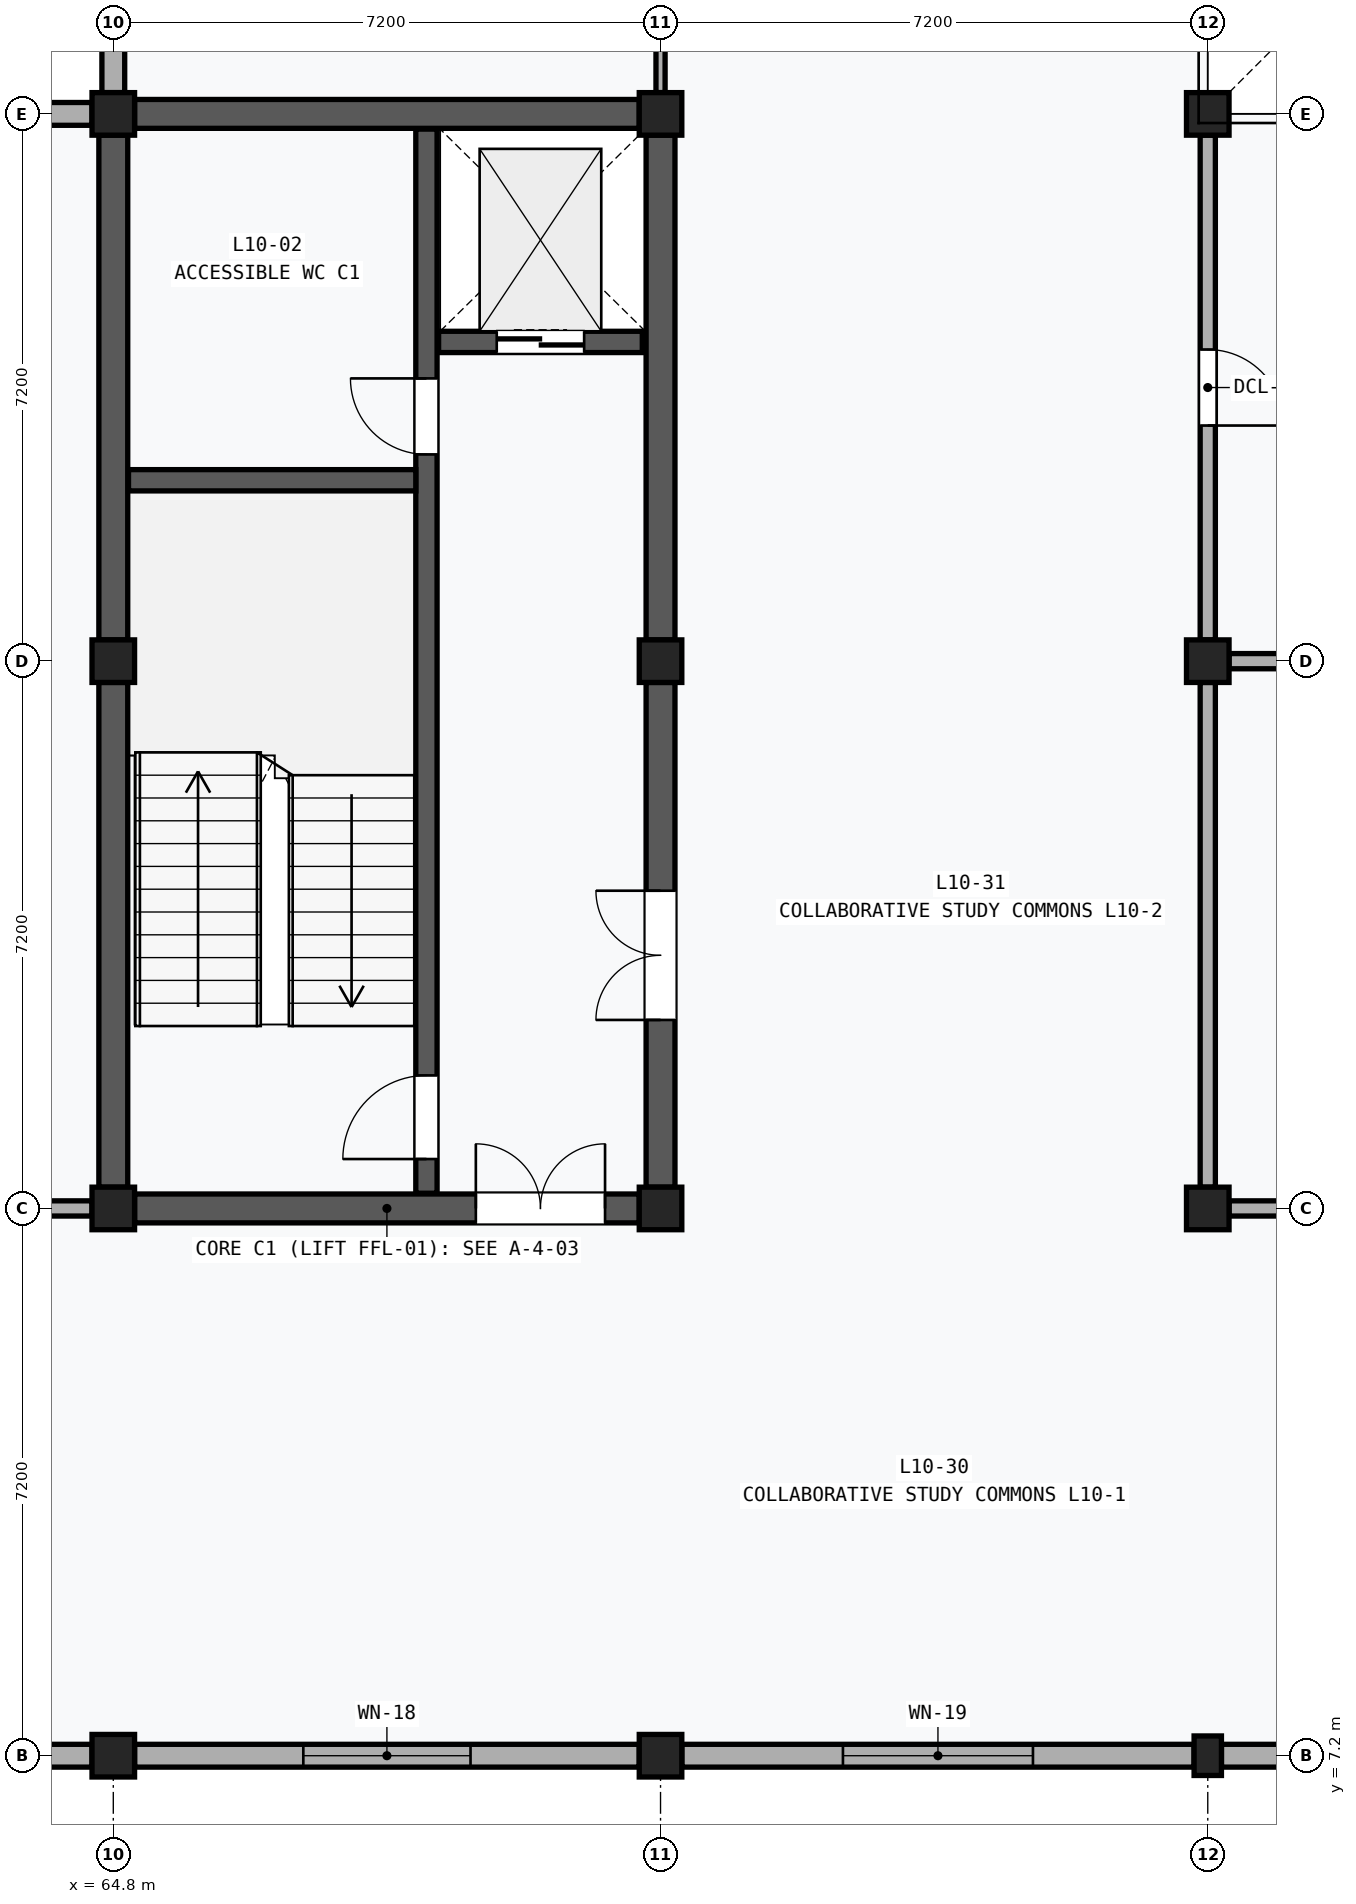
"""IFC4 building model, lengths in metres.
Left out: names, types, materials, properties, quantities, classifications, styles, units other than length and angle.
Written with IfcOpenShell. Run it as: python <this file> out.ifc"""

import sys

from ifc_helpers import new_model, si_unit, direction, frame, frame_2d, origin, origin_2d, place, context, subcontext, project, spatial, rectangle, extrude, element, fill, save


model = new_model("IFC4")
c1 = context("Model", 3, precision=1e-05, world=origin(), true_north=direction((0.0, 1.0)))
c2 = subcontext(c1, "Body", "Model", "MODEL_VIEW")
j1 = project(units=[si_unit("LENGTHUNIT", "METRE"), si_unit("PLANEANGLEUNIT", "RADIAN")], contexts=[c1])
p1 = place(None, origin())
s1 = spatial("IfcSite", under=j1, at=p1, CompositionType="ELEMENT")
p2 = place(p1, origin())
s2 = spatial("IfcBuilding", under=s1, at=p2, CompositionType="ELEMENT")
p3 = place(p2, frame((0.0, 0.0, 42.8)))
s3 = spatial("IfcBuildingStorey", under=s2, at=p3, CompositionType="ELEMENT", Elevation=42.8)
for number, where, z_axis, x_axis in (
    (1, (64.8, 7.2, 0.0), (0.0, 0.0, 1.0), (1.0, 0.0, 0.0)),
    (2, (64.8, 14.4, 0.0), (0.0, 0.0, 1.0), (1.0, 0.0, 0.0)),
    (3, (64.8, 21.6, 0.0), (0.0, 0.0, 1.0), (1.0, 0.0, 0.0)),
    (4, (64.8, 28.8, 0.0), (0.0, 0.0, 1.0), (1.0, 0.0, 0.0)),
    (5, (72.0, 7.2, 0.0), (0.0, 0.0, 1.0), (1.0, 0.0, 0.0)),
    (6, (72.0, 14.4, 0.0), (0.0, 0.0, 1.0), (1.0, 0.0, 0.0)),
    (7, (72.0, 21.6, 0.0), (0.0, 0.0, 1.0), (1.0, 0.0, 0.0)),
    (8, (72.0, 28.8, 0.0), (0.0, 0.0, 1.0), (1.0, 0.0, 0.0)),
):
    element("IfcColumn", number, at=place(p3, frame(where, z_axis=z_axis, x_axis=x_axis)), inside=s3, PredefinedType="COLUMN", context=c2, shape_type="SweptSolid", body=[
        extrude(rectangle(XDim=0.56, YDim=0.56, at=origin_2d()), origin(), (0.0, 0.0, 1.0), 4.0),
    ])
p4 = place(p3, frame((79.2, 7.2, 0.0), z_axis=(0.0, 0.0, 1.0), x_axis=(1.0, 0.0, 0.0)))
e9 = element("IfcColumn", 9, at=p4, inside=s3, PredefinedType="PILASTER", context=c2, shape_type="SweptSolid", body=[
    extrude(rectangle(XDim=0.36, YDim=0.52, at=origin_2d()), origin(), (0.0, 0.0, 1.0), 4.0),
])
for number, where, z_axis, x_axis in (
    (10, (79.2, 14.4, 0.0), (0.0, 0.0, 1.0), (1.0, 0.0, 0.0)),
    (11, (79.2, 21.6, 0.0), (0.0, 0.0, 1.0), (1.0, 0.0, 0.0)),
    (12, (79.2, 28.8, 0.0), (0.0, 0.0, 1.0), (1.0, 0.0, 0.0)),
):
    element("IfcColumn", number, at=place(p3, frame(where, z_axis=z_axis, x_axis=x_axis)), inside=s3, PredefinedType="COLUMN", context=c2, shape_type="SweptSolid", body=[
        extrude(rectangle(XDim=0.56, YDim=0.56, at=origin_2d()), origin(), (0.0, 0.0, 1.0), 4.0),
    ])
p5 = place(p3, frame((57.88, 7.2, 0.0), z_axis=(0.0, 0.0, 1.0), x_axis=(1.0, 0.0, 0.0)))
e13 = element("IfcWall", 13, at=p5, inside=s3, PredefinedType="SOLIDWALL", context=c2, shape_type="SweptSolid", body=[
    extrude(rectangle(XDim=6.64, YDim=0.3, at=frame_2d((3.32, 0.0))), origin(), (0.0, 0.0, 1.0), 3.18),
])
p6 = place(p5, frame((2.37, 0.0, 1.1)))
e14 = element("IfcOpeningElement", 14, at=p6, cuts=e13, PredefinedType="OPENING", context=c2, shape_type="SweptSolid", body=[
    extrude(rectangle(XDim=1.9, YDim=1.5, at=frame_2d((0.95, 0.75))), frame((0.0, 0.162, 0.0), z_axis=(0.0, -1.0, 0.0), x_axis=(1.0, 0.0, 0.0)), (0.0, 0.0, 1.0), 0.324),
])
p7 = place(p3, frame((57.78, 28.8, 0.0), z_axis=(0.0, 0.0, 1.0), x_axis=(1.0, 0.0, 0.0)))
e15 = element("IfcWall", 15, at=p7, inside=s3, PredefinedType="SOLIDWALL", context=c2, shape_type="SweptSolid", body=[
    extrude(rectangle(XDim=6.74, YDim=0.3, at=frame_2d((3.37, 0.0))), origin(), (0.0, 0.0, 1.0), 3.18),
])
p8 = place(p7, frame((2.62, 0.0, 1.2)))
e16 = element("IfcOpeningElement", 16, at=p8, cuts=e15, PredefinedType="OPENING", context=c2, shape_type="SweptSolid", body=[
    extrude(rectangle(XDim=1.5, YDim=1.35, at=frame_2d((0.75, 0.675))), frame((0.0, 0.162, 0.0), z_axis=(0.0, -1.0, 0.0), x_axis=(1.0, 0.0, 0.0)), (0.0, 0.0, 1.0), 0.324),
])
p9 = place(p3, frame((65.08, 7.2, 0.0), z_axis=(0.0, 0.0, 1.0), x_axis=(1.0, 0.0, 0.0)))
e17 = element("IfcWall", 17, at=p9, inside=s3, PredefinedType="SOLIDWALL", context=c2, shape_type="SweptSolid", body=[
    extrude(rectangle(XDim=6.64, YDim=0.3, at=frame_2d((3.32, 0.0))), origin(), (0.0, 0.0, 1.0), 3.18),
])
p10 = place(p9, frame((2.22, 0.0, 1.1)))
e18 = element("IfcOpeningElement", 18, at=p10, cuts=e17, PredefinedType="OPENING", context=c2, shape_type="SweptSolid", body=[
    extrude(rectangle(XDim=2.2, YDim=1.5, at=frame_2d((1.1, 0.75))), frame((0.0, 0.162, 0.0), z_axis=(0.0, -1.0, 0.0), x_axis=(1.0, 0.0, 0.0)), (0.0, 0.0, 1.0), 0.324),
])
p11 = place(p3, frame((64.8, 29.08, 0.0), z_axis=(0.0, 0.0, 1.0), x_axis=(0.0, 1.0, 0.0)))
e19 = element("IfcWall", 19, at=p11, inside=s3, PredefinedType="SOLIDWALL", context=c2, shape_type="SweptSolid", body=[
    extrude(rectangle(XDim=6.64, YDim=0.3, at=frame_2d((3.32, 0.0))), origin(), (0.0, 0.0, 1.0), 3.18),
])
p12 = place(p3, frame((72.28, 7.2, 0.0), z_axis=(0.0, 0.0, 1.0), x_axis=(1.0, 0.0, 0.0)))
e20 = element("IfcWall", 20, at=p12, inside=s3, PredefinedType="SOLIDWALL", context=c2, shape_type="SweptSolid", body=[
    extrude(rectangle(XDim=6.74, YDim=0.3, at=frame_2d((3.37, 0.0))), origin(), (0.0, 0.0, 1.0), 3.18),
])
p13 = place(p12, frame((2.12, 0.0, 1.1)))
e21 = element("IfcOpeningElement", 21, at=p13, cuts=e20, PredefinedType="OPENING", context=c2, shape_type="SweptSolid", body=[
    extrude(rectangle(XDim=2.5, YDim=1.5, at=frame_2d((1.25, 0.75))), frame((0.0, 0.162, 0.0), z_axis=(0.0, -1.0, 0.0), x_axis=(1.0, 0.0, 0.0)), (0.0, 0.0, 1.0), 0.324),
])
p14 = place(p3, frame((79.38, 7.2, 0.0), z_axis=(0.0, 0.0, 1.0), x_axis=(1.0, 0.0, 0.0)))
e22 = element("IfcWall", 22, at=p14, inside=s3, PredefinedType="SOLIDWALL", context=c2, shape_type="SweptSolid", body=[
    extrude(rectangle(XDim=6.74, YDim=0.3, at=frame_2d((3.37, 0.0))), origin(), (0.0, 0.0, 1.0), 3.18),
])
p15 = place(p14, frame((2.62, 0.0, 1.2)))
e23 = element("IfcOpeningElement", 23, at=p15, cuts=e22, PredefinedType="OPENING", context=c2, shape_type="SweptSolid", body=[
    extrude(rectangle(XDim=1.5, YDim=1.35, at=frame_2d((0.75, 0.675))), frame((0.0, 0.162, 0.0), z_axis=(0.0, -1.0, 0.0), x_axis=(1.0, 0.0, 0.0)), (0.0, 0.0, 1.0), 0.324),
])
for number, where, z_axis, x_axis in (
    (24, (64.8, 14.68, 0.0), (0.0, 0.0, 1.0), (0.0, 1.0, 0.0)),
    (25, (64.8, 21.88, 0.0), (0.0, 0.0, 1.0), (0.0, 1.0, 0.0)),
):
    element("IfcWall", number, at=place(p3, frame(where, z_axis=z_axis, x_axis=x_axis)), inside=s3, PredefinedType="SHEAR", context=c2, shape_type="SweptSolid", body=[
        extrude(rectangle(XDim=6.64, YDim=0.38, at=frame_2d((3.32, 0.0))), origin(), (0.0, 0.0, 1.0), 3.02),
    ])
p16 = place(p3, frame((72.0, 14.68, 0.0), z_axis=(0.0, 0.0, 1.0), x_axis=(0.0, 1.0, 0.0)))
e26 = element("IfcWall", 26, at=p16, inside=s3, PredefinedType="SHEAR", context=c2, shape_type="SweptSolid", body=[
    extrude(rectangle(XDim=6.64, YDim=0.38, at=frame_2d((3.32, 0.0))), origin(), (0.0, 0.0, 1.0), 3.02),
])
p17 = place(p16, frame((2.2, 0.0, 0.0)))
e27 = element("IfcOpeningElement", 27, at=p17, cuts=e26, PredefinedType="OPENING", context=c2, shape_type="SweptSolid", body=[
    extrude(rectangle(XDim=1.7, YDim=2.25, at=frame_2d((0.85, 1.125))), frame((0.0, 0.202, 0.0), z_axis=(0.0, -1.0, 0.0), x_axis=(1.0, 0.0, 0.0)), (0.0, 0.0, 1.0), 0.404),
])
p18 = place(p3, frame((72.0, 21.88, 0.0), z_axis=(0.0, 0.0, 1.0), x_axis=(0.0, 1.0, 0.0)))
e28 = element("IfcWall", 28, at=p18, inside=s3, PredefinedType="SHEAR", context=c2, shape_type="SweptSolid", body=[
    extrude(rectangle(XDim=6.64, YDim=0.38, at=frame_2d((3.32, 0.0))), origin(), (0.0, 0.0, 1.0), 3.02),
])
p19 = place(p3, frame((65.08, 14.4, 0.0), z_axis=(0.0, 0.0, 1.0), x_axis=(1.0, 0.0, 0.0)))
e29 = element("IfcWall", 29, at=p19, inside=s3, PredefinedType="SHEAR", context=c2, shape_type="SweptSolid", body=[
    extrude(rectangle(XDim=6.64, YDim=0.38, at=frame_2d((3.32, 0.0))), origin(), (0.0, 0.0, 1.0), 3.02),
])
p20 = place(p19, frame((4.49, 0.0, 0.0)))
e30 = element("IfcOpeningElement", 30, at=p20, cuts=e29, PredefinedType="OPENING", context=c2, shape_type="SweptSolid", body=[
    extrude(rectangle(XDim=1.7, YDim=2.25, at=frame_2d((0.85, 1.125))), frame((0.0, 0.202, 0.0), z_axis=(0.0, -1.0, 0.0), x_axis=(1.0, 0.0, 0.0)), (0.0, 0.0, 1.0), 0.404),
])
p21 = place(p3, frame((65.08, 28.8, 0.0), z_axis=(0.0, 0.0, 1.0), x_axis=(1.0, 0.0, 0.0)))
e31 = element("IfcWall", 31, at=p21, inside=s3, PredefinedType="SHEAR", context=c2, shape_type="SweptSolid", body=[
    extrude(rectangle(XDim=6.64, YDim=0.38, at=frame_2d((3.32, 0.0))), origin(), (0.0, 0.0, 1.0), 3.02),
])
p22 = place(p3, frame((68.92, 14.6, 0.0), z_axis=(0.0, 0.0, 1.0), x_axis=(0.0, 1.0, 0.0)))
e32 = element("IfcWall", 32, at=p22, inside=s3, PredefinedType="SHEAR", context=c2, shape_type="SweptSolid", body=[
    extrude(rectangle(XDim=14.0, YDim=0.28, at=frame_2d((7.0, 0.0))), origin(), (0.0, 0.0, 1.0), 3.75),
])
p23 = place(p22, frame((0.45, 0.0, 0.0)))
e33 = element("IfcOpeningElement", 33, at=p23, cuts=e32, PredefinedType="OPENING", context=c2, shape_type="SweptSolid", body=[
    extrude(rectangle(XDim=1.1, YDim=2.15, at=frame_2d((0.55, 1.075))), frame((0.0, 0.152, 0.0), z_axis=(0.0, -1.0, 0.0), x_axis=(1.0, 0.0, 0.0)), (0.0, 0.0, 1.0), 0.304),
])
p24 = place(p22, frame((9.72, 0.0, 0.0)))
e34 = element("IfcOpeningElement", 34, at=p24, cuts=e32, PredefinedType="OPENING", context=c2, shape_type="SweptSolid", body=[
    extrude(rectangle(XDim=1.0, YDim=2.15, at=frame_2d((0.5, 1.075))), frame((0.0, 0.152, 0.0), z_axis=(0.0, -1.0, 0.0), x_axis=(1.0, 0.0, 0.0)), (0.0, 0.0, 1.0), 0.304),
])
p25 = place(p3, frame((65.0, 23.98, 0.0), z_axis=(0.0, 0.0, 1.0), x_axis=(1.0, 0.0, 0.0)))
e35 = element("IfcWall", 35, at=p25, inside=s3, PredefinedType="SHEAR", context=c2, shape_type="SweptSolid", body=[
    extrude(rectangle(XDim=3.78, YDim=0.28, at=frame_2d((1.89, 0.0))), origin(), (0.0, 0.0, 1.0), 3.75),
])
p26 = place(p3, frame((69.08, 25.8, 0.0), z_axis=(0.0, 0.0, 1.0), x_axis=(1.0, 0.0, 0.0)))
e36 = element("IfcWall", 36, at=p26, inside=s3, PredefinedType="SHEAR", context=c2, shape_type="SweptSolid", body=[
    extrude(rectangle(XDim=2.68, YDim=0.28, at=frame_2d((1.34, 0.0))), origin(), (0.0, 0.0, 1.0), 3.75),
])
p27 = place(p26, frame((0.765, 0.0, 0.0)))
e37 = element("IfcOpeningElement", 37, at=p27, cuts=e36, PredefinedType="OPENING", context=c2, shape_type="SweptSolid", body=[
    extrude(rectangle(XDim=1.15, YDim=2.2, at=frame_2d((0.575, 1.1))), frame((0.0, 0.152, 0.0), z_axis=(0.0, -1.0, 0.0), x_axis=(1.0, 0.0, 0.0)), (0.0, 0.0, 1.0), 0.304),
])
p28 = place(p3, frame((57.88, 14.4, 0.0), z_axis=(0.0, 0.0, 1.0), x_axis=(1.0, 0.0, 0.0)))
e38 = element("IfcWall", 38, at=p28, inside=s3, PredefinedType="PARTITIONING", context=c2, shape_type="SweptSolid", body=[
    extrude(rectangle(XDim=6.64, YDim=0.2, at=frame_2d((3.32, 0.0))), origin(), (0.0, 0.0, 1.0), 3.02),
])
p29 = place(p28, frame((2.74, 0.0, 0.0)))
e39 = element("IfcOpeningElement", 39, at=p29, cuts=e38, PredefinedType="OPENING", context=c2, shape_type="SweptSolid", body=[
    extrude(rectangle(XDim=1.16, YDim=2.22, at=frame_2d((0.58, 1.11))), frame((0.0, 0.112, 0.0), z_axis=(0.0, -1.0, 0.0), x_axis=(1.0, 0.0, 0.0)), (0.0, 0.0, 1.0), 0.224),
])
p30 = place(p3, frame((72.0, 29.08, 0.0), z_axis=(0.0, 0.0, 1.0), x_axis=(0.0, 1.0, 0.0)))
e40 = element("IfcWall", 40, at=p30, inside=s3, PredefinedType="MOVABLE", context=c2, shape_type="SweptSolid", body=[
    extrude(rectangle(XDim=6.64, YDim=0.12, at=frame_2d((3.32, 0.0))), origin(), (0.0, 0.0, 1.0), 3.02),
])
p31 = place(p30, frame((2.72, 0.0, 0.0)))
e41 = element("IfcOpeningElement", 41, at=p31, cuts=e40, PredefinedType="OPENING", context=c2, shape_type="SweptSolid", body=[
    extrude(rectangle(XDim=1.2, YDim=2.24, at=frame_2d((0.6, 1.12))), frame((0.0, 0.072, 0.0), z_axis=(0.0, -1.0, 0.0), x_axis=(1.0, 0.0, 0.0)), (0.0, 0.0, 1.0), 0.144),
])
p32 = place(p3, frame((79.48, 14.4, 0.0), z_axis=(0.0, 0.0, 1.0), x_axis=(1.0, 0.0, 0.0)))
e42 = element("IfcWall", 42, at=p32, inside=s3, PredefinedType="PARTITIONING", context=c2, shape_type="SweptSolid", body=[
    extrude(rectangle(XDim=6.64, YDim=0.2, at=frame_2d((3.32, 0.0))), origin(), (0.0, 0.0, 1.0), 3.02),
])
p33 = place(p32, frame((2.68, 0.0, 0.0)))
e43 = element("IfcOpeningElement", 43, at=p33, cuts=e42, PredefinedType="OPENING", context=c2, shape_type="SweptSolid", body=[
    extrude(rectangle(XDim=1.28, YDim=2.28, at=frame_2d((0.64, 1.14))), frame((0.0, 0.112, 0.0), z_axis=(0.0, -1.0, 0.0), x_axis=(1.0, 0.0, 0.0)), (0.0, 0.0, 1.0), 0.224),
])
for number, where, z_axis, x_axis in (
    (44, (79.48, 21.6, 0.0), (0.0, 0.0, 1.0), (1.0, 0.0, 0.0)),
    (45, (79.2, 14.68, 0.0), (0.0, 0.0, 1.0), (0.0, 1.0, 0.0)),
):
    element("IfcWall", number, at=place(p3, frame(where, z_axis=z_axis, x_axis=x_axis)), inside=s3, PredefinedType="PARTITIONING", context=c2, shape_type="SweptSolid", body=[
        extrude(rectangle(XDim=6.64, YDim=0.2, at=frame_2d((3.32, 0.0))), origin(), (0.0, 0.0, 1.0), 3.02),
    ])
p34 = place(p3, frame((79.2, 21.88, 0.0), z_axis=(0.0, 0.0, 1.0), x_axis=(0.0, 1.0, 0.0)))
e46 = element("IfcWall", 46, at=p34, inside=s3, PredefinedType="PARTITIONING", context=c2, shape_type="SweptSolid", body=[
    extrude(rectangle(XDim=6.64, YDim=0.2, at=frame_2d((3.32, 0.0))), origin(), (0.0, 0.0, 1.0), 3.02),
])
p35 = place(p34, frame((2.82, 0.0, 0.0)))
e47 = element("IfcOpeningElement", 47, at=p35, cuts=e46, PredefinedType="OPENING", context=c2, shape_type="SweptSolid", body=[
    extrude(rectangle(XDim=1.0, YDim=2.1, at=frame_2d((0.5, 1.05))), frame((0.0, 0.112, 0.0), z_axis=(0.0, -1.0, 0.0), x_axis=(1.0, 0.0, 0.0)), (0.0, 0.0, 1.0), 0.224),
])
p36 = place(p10, origin())
e48 = element("IfcWindow", 48, at=p36, inside=s3, PartitioningType="SINGLE_PANEL", PredefinedType="WINDOW", context=c2, shape_type="SweptSolid", body=[
    extrude(rectangle(XDim=2.2, YDim=1.5, at=frame_2d((1.1, 0.75))), frame((0.0, 0.03, 0.0), z_axis=(0.0, -1.0, 0.0), x_axis=(1.0, 0.0, 0.0)), (0.0, 0.0, 1.0), 0.06),
])
fill(e18, e48)
p37 = place(p13, origin())
e49 = element("IfcWindow", 49, at=p37, inside=s3, PartitioningType="SINGLE_PANEL", PredefinedType="WINDOW", context=c2, shape_type="SweptSolid", body=[
    extrude(rectangle(XDim=2.5, YDim=1.5, at=frame_2d((1.25, 0.75))), frame((0.0, 0.03, 0.0), z_axis=(0.0, -1.0, 0.0), x_axis=(1.0, 0.0, 0.0)), (0.0, 0.0, 1.0), 0.06),
])
fill(e21, e49)
p38 = place(p17, origin())
e50 = element("IfcDoor", 50, at=p38, inside=s3, OperationType="DOUBLE_DOOR_SINGLE_SWING", PredefinedType="DOOR", context=c2, shape_type="SweptSolid", body=[
    extrude(rectangle(XDim=1.7, YDim=2.25, at=frame_2d((0.85, 1.125))), frame((0.0, 0.025, 0.0), z_axis=(0.0, -1.0, 0.0), x_axis=(1.0, 0.0, 0.0)), (0.0, 0.0, 1.0), 0.05),
])
fill(e27, e50)
p39 = place(p20, origin())
e51 = element("IfcDoor", 51, at=p39, inside=s3, OperationType="DOUBLE_DOOR_SINGLE_SWING", PredefinedType="DOOR", context=c2, shape_type="SweptSolid", body=[
    extrude(rectangle(XDim=1.7, YDim=2.25, at=frame_2d((0.85, 1.125))), frame((0.0, 0.025, 0.0), z_axis=(0.0, -1.0, 0.0), x_axis=(1.0, 0.0, 0.0)), (0.0, 0.0, 1.0), 0.05),
])
fill(e30, e51)
p40 = place(p23, origin())
e52 = element("IfcDoor", 52, at=p40, inside=s3, OperationType="SINGLE_SWING_LEFT", PredefinedType="DOOR", context=c2, shape_type="SweptSolid", body=[
    extrude(rectangle(XDim=1.1, YDim=2.15, at=frame_2d((0.55, 1.075))), frame((0.0, 0.025, 0.0), z_axis=(0.0, -1.0, 0.0), x_axis=(1.0, 0.0, 0.0)), (0.0, 0.0, 1.0), 0.05),
])
fill(e33, e52)
p41 = place(p24, origin())
e53 = element("IfcDoor", 53, at=p41, inside=s3, OperationType="SINGLE_SWING_RIGHT", PredefinedType="DOOR", context=c2, shape_type="SweptSolid", body=[
    extrude(rectangle(XDim=1.0, YDim=2.15, at=frame_2d((0.5, 1.075))), frame((0.0, 0.025, 0.0), z_axis=(0.0, -1.0, 0.0), x_axis=(1.0, 0.0, 0.0)), (0.0, 0.0, 1.0), 0.05),
])
fill(e34, e53)
p42 = place(p27, frame((1.15, 0.0, 0.0), z_axis=(0.0, 0.0, 1.0), x_axis=(-1.0, 0.0, 0.0)))
e54 = element("IfcDoor", 54, at=p42, inside=s3, OperationType="DOUBLE_DOOR_SLIDING", PredefinedType="DOOR", context=c2, shape_type="SweptSolid", body=[
    extrude(rectangle(XDim=1.15, YDim=2.2, at=frame_2d((0.575, 1.1))), frame((0.0, 0.025, 0.0), z_axis=(0.0, -1.0, 0.0), x_axis=(1.0, 0.0, 0.0)), (0.0, 0.0, 1.0), 0.05),
])
fill(e37, e54)
p43 = place(p35, frame((1.0, 0.0, 0.0), z_axis=(0.0, 0.0, 1.0), x_axis=(-1.0, 0.0, 0.0)))
e55 = element("IfcDoor", 55, at=p43, inside=s3, OperationType="SINGLE_SWING_RIGHT", PredefinedType="DOOR", context=c2, shape_type="SweptSolid", body=[
    extrude(rectangle(XDim=1.0, YDim=2.1, at=frame_2d((0.5, 1.05))), frame((0.0, 0.025, 0.0), z_axis=(0.0, -1.0, 0.0), x_axis=(1.0, 0.0, 0.0)), (0.0, 0.0, 1.0), 0.05),
])
fill(e47, e55)
save(model, sys.argv[1])
